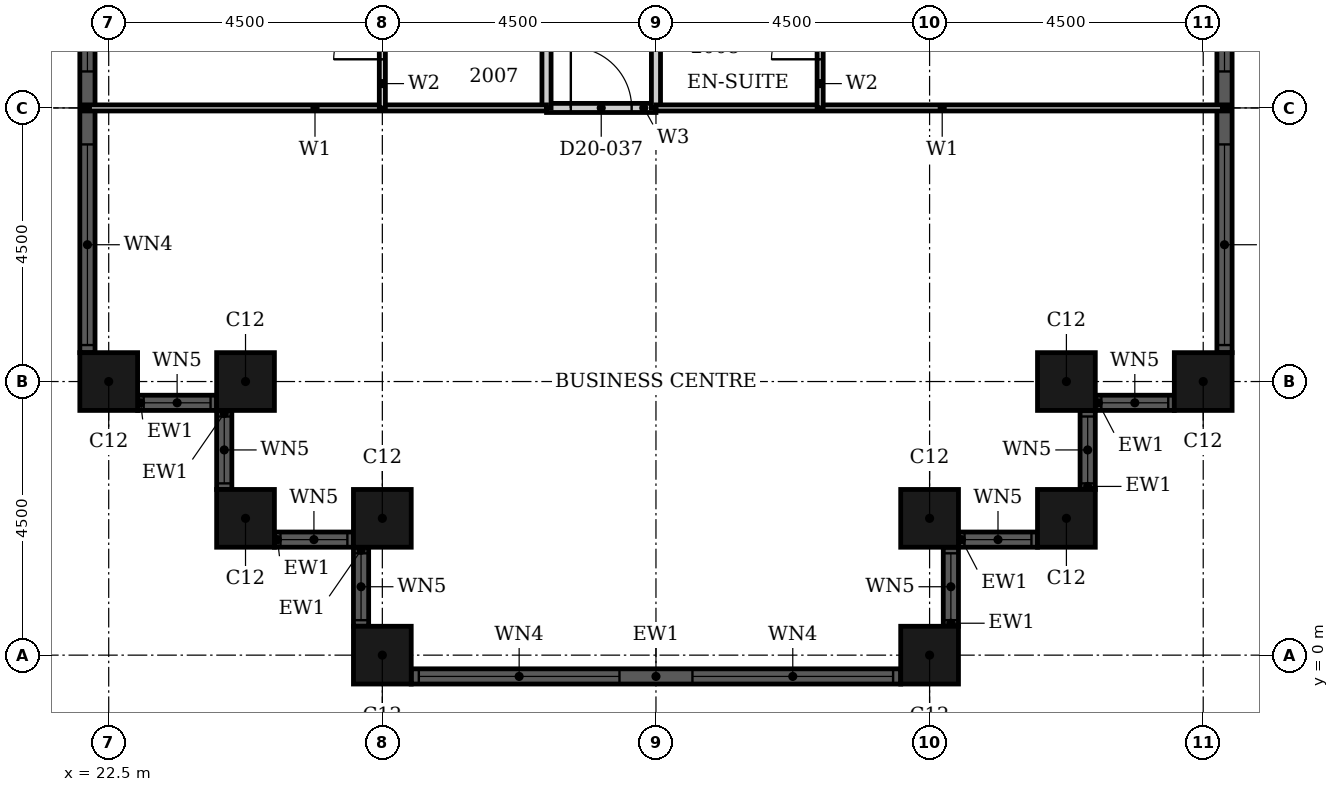
"""IFC4 building model, lengths in metres.
Left out: names, types, materials, properties, quantities, classifications, styles, units other than length and angle.
Written with IfcOpenShell. Run it as: python <this file> out.ifc"""

import sys

from ifc_helpers import new_model, si_unit, direction, frame, frame_2d, origin, origin_2d, place, context, subcontext, project, spatial, rectangle, hollow_rectangle, extrude, element, fill, save


model = new_model("IFC4")
c1 = context("Model", 3, precision=1e-05, world=origin(), true_north=direction((0.0, 1.0)))
c2 = subcontext(c1, "Body", "Model", "MODEL_VIEW")
j1 = project(units=[si_unit("LENGTHUNIT", "METRE"), si_unit("PLANEANGLEUNIT", "RADIAN")], contexts=[c1])
p1 = place(None, origin())
s1 = spatial("IfcSite", under=j1, at=p1, CompositionType="ELEMENT")
p2 = place(p1, origin())
s2 = spatial("IfcBuilding", under=s1, at=p2, CompositionType="ELEMENT")
p3 = place(p2, frame((0.0, 0.0, 85.2)))
s3 = spatial("IfcBuildingStorey", under=s2, at=p3, CompositionType="ELEMENT", Elevation=85.2)
for number, where, z_axis, x_axis in (
    (1, (22.5, 4.5, 0.0), (0.0, 0.0, 1.0), (1.0, 0.0, 0.0)),
    (2, (24.75, 4.5, 0.0), (0.0, 0.0, 1.0), (1.0, 0.0, 0.0)),
    (3, (24.75, 2.25, 0.0), (0.0, 0.0, 1.0), (1.0, 0.0, 0.0)),
    (4, (27.0, 2.25, 0.0), (0.0, 0.0, 1.0), (1.0, 0.0, 0.0)),
    (5, (27.0, 0.0, 0.0), (0.0, 0.0, 1.0), (1.0, 0.0, 0.0)),
    (6, (36.0, 0.0, 0.0), (0.0, 0.0, 1.0), (1.0, 0.0, 0.0)),
    (7, (36.0, 2.25, 0.0), (0.0, 0.0, 1.0), (1.0, 0.0, 0.0)),
    (8, (38.25, 2.25, 0.0), (0.0, 0.0, 1.0), (1.0, 0.0, 0.0)),
    (9, (38.25, 4.5, 0.0), (0.0, 0.0, 1.0), (1.0, 0.0, 0.0)),
    (10, (40.5, 4.5, 0.0), (0.0, 0.0, 1.0), (1.0, 0.0, 0.0)),
):
    element("IfcColumn", number, at=place(p3, frame(where, z_axis=z_axis, x_axis=x_axis)), inside=s3, PredefinedType="COLUMN", context=c2, shape_type="SweptSolid", body=[
        extrude(hollow_rectangle(XDim=0.95, YDim=0.95, WallThickness=0.03, at=origin_2d()), origin(), (0.0, 0.0, 1.0), 3.6),
    ])
p4 = place(p3, frame((22.975, 4.15, 0.0), z_axis=(0.0, 0.0, 1.0), x_axis=(1.0, 0.0, 0.0)))
e11 = element("IfcWall", 11, at=p4, inside=s3, PredefinedType="SOLIDWALL", context=c2, shape_type="SweptSolid", body=[
    extrude(rectangle(XDim=1.3, YDim=0.25, at=frame_2d((0.65, 0.0))), origin(), (0.0, 0.0, 1.0), 3.6),
])
p5 = place(p4, frame((0.1, 0.0, 0.9)))
e12 = element("IfcOpeningElement", 12, at=p5, cuts=e11, PredefinedType="OPENING", context=c2, shape_type="SweptSolid", body=[
    extrude(rectangle(XDim=1.1, YDim=2.08, at=frame_2d((0.55, 1.04))), frame((0.0, 0.135, 0.0), z_axis=(0.0, -1.0, 0.0), x_axis=(1.0, 0.0, 0.0)), (0.0, 0.0, 1.0), 0.27),
])
p6 = place(p3, frame((24.4, 4.025, 0.0), z_axis=(0.0, 0.0, 1.0), x_axis=(0.0, -1.0, 0.0)))
e13 = element("IfcWall", 13, at=p6, inside=s3, PredefinedType="SOLIDWALL", context=c2, shape_type="SweptSolid", body=[
    extrude(rectangle(XDim=1.3, YDim=0.25, at=frame_2d((0.65, 0.0))), origin(), (0.0, 0.0, 1.0), 3.6),
])
p7 = place(p6, frame((0.1, 0.0, 0.9)))
e14 = element("IfcOpeningElement", 14, at=p7, cuts=e13, PredefinedType="OPENING", context=c2, shape_type="SweptSolid", body=[
    extrude(rectangle(XDim=1.1, YDim=2.08, at=frame_2d((0.55, 1.04))), frame((0.0, 0.135, 0.0), z_axis=(0.0, -1.0, 0.0), x_axis=(1.0, 0.0, 0.0)), (0.0, 0.0, 1.0), 0.27),
])
p8 = place(p3, frame((25.225, 1.9, 0.0), z_axis=(0.0, 0.0, 1.0), x_axis=(1.0, 0.0, 0.0)))
e15 = element("IfcWall", 15, at=p8, inside=s3, PredefinedType="SOLIDWALL", context=c2, shape_type="SweptSolid", body=[
    extrude(rectangle(XDim=1.3, YDim=0.25, at=frame_2d((0.65, 0.0))), origin(), (0.0, 0.0, 1.0), 3.6),
])
p9 = place(p8, frame((0.1, 0.0, 0.9)))
e16 = element("IfcOpeningElement", 16, at=p9, cuts=e15, PredefinedType="OPENING", context=c2, shape_type="SweptSolid", body=[
    extrude(rectangle(XDim=1.1, YDim=2.08, at=frame_2d((0.55, 1.04))), frame((0.0, 0.135, 0.0), z_axis=(0.0, -1.0, 0.0), x_axis=(1.0, 0.0, 0.0)), (0.0, 0.0, 1.0), 0.27),
])
p10 = place(p3, frame((26.65, 1.775, 0.0), z_axis=(0.0, 0.0, 1.0), x_axis=(0.0, -1.0, 0.0)))
e17 = element("IfcWall", 17, at=p10, inside=s3, PredefinedType="SOLIDWALL", context=c2, shape_type="SweptSolid", body=[
    extrude(rectangle(XDim=1.3, YDim=0.25, at=frame_2d((0.65, 0.0))), origin(), (0.0, 0.0, 1.0), 3.6),
])
p11 = place(p10, frame((0.1, 0.0, 0.9)))
e18 = element("IfcOpeningElement", 18, at=p11, cuts=e17, PredefinedType="OPENING", context=c2, shape_type="SweptSolid", body=[
    extrude(rectangle(XDim=1.1, YDim=2.08, at=frame_2d((0.55, 1.04))), frame((0.0, 0.135, 0.0), z_axis=(0.0, -1.0, 0.0), x_axis=(1.0, 0.0, 0.0)), (0.0, 0.0, 1.0), 0.27),
])
p12 = place(p3, frame((27.475, -0.35, 0.0), z_axis=(0.0, 0.0, 1.0), x_axis=(1.0, 0.0, 0.0)))
e19 = element("IfcWall", 19, at=p12, inside=s3, PredefinedType="SOLIDWALL", context=c2, shape_type="SweptSolid", body=[
    extrude(rectangle(XDim=8.05, YDim=0.25, at=frame_2d((4.025, 0.0))), origin(), (0.0, 0.0, 1.0), 3.6),
])
p13 = place(p12, frame((0.125, 0.0, 0.9)))
e20 = element("IfcOpeningElement", 20, at=p13, cuts=e19, PredefinedType="OPENING", context=c2, shape_type="SweptSolid", body=[
    extrude(rectangle(XDim=3.3, YDim=2.08, at=frame_2d((1.65, 1.04))), frame((0.0, 0.135, 0.0), z_axis=(0.0, -1.0, 0.0), x_axis=(1.0, 0.0, 0.0)), (0.0, 0.0, 1.0), 0.27),
])
p14 = place(p12, frame((4.625, 0.0, 0.9)))
e21 = element("IfcOpeningElement", 21, at=p14, cuts=e19, PredefinedType="OPENING", context=c2, shape_type="SweptSolid", body=[
    extrude(rectangle(XDim=3.3, YDim=2.08, at=frame_2d((1.65, 1.04))), frame((0.0, 0.135, 0.0), z_axis=(0.0, -1.0, 0.0), x_axis=(1.0, 0.0, 0.0)), (0.0, 0.0, 1.0), 0.27),
])
p15 = place(p3, frame((36.35, 0.475, 0.0), z_axis=(0.0, 0.0, 1.0), x_axis=(0.0, 1.0, 0.0)))
e22 = element("IfcWall", 22, at=p15, inside=s3, PredefinedType="SOLIDWALL", context=c2, shape_type="SweptSolid", body=[
    extrude(rectangle(XDim=1.3, YDim=0.25, at=frame_2d((0.65, 0.0))), origin(), (0.0, 0.0, 1.0), 3.6),
])
p16 = place(p15, frame((0.1, 0.0, 0.9)))
e23 = element("IfcOpeningElement", 23, at=p16, cuts=e22, PredefinedType="OPENING", context=c2, shape_type="SweptSolid", body=[
    extrude(rectangle(XDim=1.1, YDim=2.08, at=frame_2d((0.55, 1.04))), frame((0.0, 0.135, 0.0), z_axis=(0.0, -1.0, 0.0), x_axis=(1.0, 0.0, 0.0)), (0.0, 0.0, 1.0), 0.27),
])
p17 = place(p3, frame((36.475, 1.9, 0.0), z_axis=(0.0, 0.0, 1.0), x_axis=(1.0, 0.0, 0.0)))
e24 = element("IfcWall", 24, at=p17, inside=s3, PredefinedType="SOLIDWALL", context=c2, shape_type="SweptSolid", body=[
    extrude(rectangle(XDim=1.3, YDim=0.25, at=frame_2d((0.65, 0.0))), origin(), (0.0, 0.0, 1.0), 3.6),
])
p18 = place(p17, frame((0.1, 0.0, 0.9)))
e25 = element("IfcOpeningElement", 25, at=p18, cuts=e24, PredefinedType="OPENING", context=c2, shape_type="SweptSolid", body=[
    extrude(rectangle(XDim=1.1, YDim=2.08, at=frame_2d((0.55, 1.04))), frame((0.0, 0.135, 0.0), z_axis=(0.0, -1.0, 0.0), x_axis=(1.0, 0.0, 0.0)), (0.0, 0.0, 1.0), 0.27),
])
p19 = place(p3, frame((38.6, 2.725, 0.0), z_axis=(0.0, 0.0, 1.0), x_axis=(0.0, 1.0, 0.0)))
e26 = element("IfcWall", 26, at=p19, inside=s3, PredefinedType="SOLIDWALL", context=c2, shape_type="SweptSolid", body=[
    extrude(rectangle(XDim=1.3, YDim=0.25, at=frame_2d((0.65, 0.0))), origin(), (0.0, 0.0, 1.0), 3.6),
])
p20 = place(p19, frame((0.1, 0.0, 0.9)))
e27 = element("IfcOpeningElement", 27, at=p20, cuts=e26, PredefinedType="OPENING", context=c2, shape_type="SweptSolid", body=[
    extrude(rectangle(XDim=1.1, YDim=2.08, at=frame_2d((0.55, 1.04))), frame((0.0, 0.135, 0.0), z_axis=(0.0, -1.0, 0.0), x_axis=(1.0, 0.0, 0.0)), (0.0, 0.0, 1.0), 0.27),
])
p21 = place(p3, frame((38.725, 4.15, 0.0), z_axis=(0.0, 0.0, 1.0), x_axis=(1.0, 0.0, 0.0)))
e28 = element("IfcWall", 28, at=p21, inside=s3, PredefinedType="SOLIDWALL", context=c2, shape_type="SweptSolid", body=[
    extrude(rectangle(XDim=1.3, YDim=0.25, at=frame_2d((0.65, 0.0))), origin(), (0.0, 0.0, 1.0), 3.6),
])
p22 = place(p21, frame((0.1, 0.0, 0.9)))
e29 = element("IfcOpeningElement", 29, at=p22, cuts=e28, PredefinedType="OPENING", context=c2, shape_type="SweptSolid", body=[
    extrude(rectangle(XDim=1.1, YDim=2.08, at=frame_2d((0.55, 1.04))), frame((0.0, 0.135, 0.0), z_axis=(0.0, -1.0, 0.0), x_axis=(1.0, 0.0, 0.0)), (0.0, 0.0, 1.0), 0.27),
])
p23 = place(p3, frame((40.85, 4.975, 0.0), z_axis=(0.0, 0.0, 1.0), x_axis=(0.0, 1.0, 0.0)))
e30 = element("IfcWall", 30, at=p23, inside=s3, PredefinedType="SOLIDWALL", context=c2, shape_type="SweptSolid", body=[
    extrude(rectangle(XDim=8.05, YDim=0.25, at=frame_2d((4.025, 0.0))), origin(), (0.0, 0.0, 1.0), 3.6),
])
p24 = place(p23, frame((0.125, 0.0, 0.9)))
e31 = element("IfcOpeningElement", 31, at=p24, cuts=e30, PredefinedType="OPENING", context=c2, shape_type="SweptSolid", body=[
    extrude(rectangle(XDim=3.3, YDim=2.08, at=frame_2d((1.65, 1.04))), frame((0.0, 0.135, 0.0), z_axis=(0.0, -1.0, 0.0), x_axis=(1.0, 0.0, 0.0)), (0.0, 0.0, 1.0), 0.27),
])
p25 = place(p23, frame((4.625, 0.0, 0.9)))
e32 = element("IfcOpeningElement", 32, at=p25, cuts=e30, PredefinedType="OPENING", context=c2, shape_type="SweptSolid", body=[
    extrude(rectangle(XDim=3.3, YDim=2.08, at=frame_2d((1.65, 1.04))), frame((0.0, 0.135, 0.0), z_axis=(0.0, -1.0, 0.0), x_axis=(1.0, 0.0, 0.0)), (0.0, 0.0, 1.0), 0.27),
])
p26 = place(p3, frame((22.15, 13.025, 0.0), z_axis=(0.0, 0.0, 1.0), x_axis=(0.0, -1.0, 0.0)))
e33 = element("IfcWall", 33, at=p26, inside=s3, PredefinedType="SOLIDWALL", context=c2, shape_type="SweptSolid", body=[
    extrude(rectangle(XDim=8.05, YDim=0.25, at=frame_2d((4.025, 0.0))), origin(), (0.0, 0.0, 1.0), 3.6),
])
p27 = place(p26, frame((0.125, 0.0, 0.9)))
e34 = element("IfcOpeningElement", 34, at=p27, cuts=e33, PredefinedType="OPENING", context=c2, shape_type="SweptSolid", body=[
    extrude(rectangle(XDim=3.3, YDim=2.08, at=frame_2d((1.65, 1.04))), frame((0.0, 0.135, 0.0), z_axis=(0.0, -1.0, 0.0), x_axis=(1.0, 0.0, 0.0)), (0.0, 0.0, 1.0), 0.27),
])
p28 = place(p26, frame((4.625, 0.0, 0.9)))
e35 = element("IfcOpeningElement", 35, at=p28, cuts=e33, PredefinedType="OPENING", context=c2, shape_type="SweptSolid", body=[
    extrude(rectangle(XDim=3.3, YDim=2.08, at=frame_2d((1.65, 1.04))), frame((0.0, 0.135, 0.0), z_axis=(0.0, -1.0, 0.0), x_axis=(1.0, 0.0, 0.0)), (0.0, 0.0, 1.0), 0.27),
])
p29 = place(p3, frame((29.7, 9.0, 0.0), z_axis=(0.0, 0.0, 1.0), x_axis=(1.0, 0.0, 0.0)))
e36 = element("IfcWall", 36, at=p29, inside=s3, PredefinedType="PARTITIONING", context=c2, shape_type="SweptSolid", body=[
    extrude(rectangle(XDim=1.8, YDim=0.15, at=frame_2d((0.9, 0.0))), origin(), (0.0, 0.0, 1.0), 3.3),
])
p30 = place(p29, frame((0.4, 0.0, 0.0)))
e37 = element("IfcOpeningElement", 37, at=p30, cuts=e36, PredefinedType="OPENING", context=c2, shape_type="SweptSolid", body=[
    extrude(rectangle(XDim=1.0, YDim=2.1, at=frame_2d((0.5, 1.05))), frame((0.0, 0.085, 0.0), z_axis=(0.0, -1.0, 0.0), x_axis=(1.0, 0.0, 0.0)), (0.0, 0.0, 1.0), 0.17),
])
p31 = place(p3, frame((29.7, 9.0, 0.0), z_axis=(0.0, 0.0, 1.0), x_axis=(0.0, 1.0, 0.0)))
e38 = element("IfcWall", 38, at=p31, inside=s3, PredefinedType="PARTITIONING", context=c2, shape_type="SweptSolid", body=[
    extrude(rectangle(XDim=11.7, YDim=0.15, at=frame_2d((5.85, 0.0))), origin(), (0.0, 0.0, 1.0), 3.3),
])
p32 = place(p31, frame((2.95, 0.0, 0.0)))
e39 = element("IfcOpeningElement", 39, at=p32, cuts=e38, PredefinedType="OPENING", context=c2, shape_type="SweptSolid", body=[
    extrude(rectangle(XDim=1.0, YDim=2.1, at=frame_2d((0.5, 1.05))), frame((0.0, 0.085, 0.0), z_axis=(0.0, -1.0, 0.0), x_axis=(1.0, 0.0, 0.0)), (0.0, 0.0, 1.0), 0.17),
])
p33 = place(p3, frame((31.5, 9.0, 0.0), z_axis=(0.0, 0.0, 1.0), x_axis=(0.0, 1.0, 0.0)))
e40 = element("IfcWall", 40, at=p33, inside=s3, PredefinedType="PARTITIONING", context=c2, shape_type="SweptSolid", body=[
    extrude(rectangle(XDim=11.7, YDim=0.15, at=frame_2d((5.85, 0.0))), origin(), (0.0, 0.0, 1.0), 2.58),
])
p34 = place(p33, frame((2.95, 0.0, 0.0)))
e41 = element("IfcOpeningElement", 41, at=p34, cuts=e40, PredefinedType="OPENING", context=c2, shape_type="SweptSolid", body=[
    extrude(rectangle(XDim=1.0, YDim=2.1, at=frame_2d((0.5, 1.05))), frame((0.0, 0.085, 0.0), z_axis=(0.0, -1.0, 0.0), x_axis=(1.0, 0.0, 0.0)), (0.0, 0.0, 1.0), 0.17),
])
p35 = place(p3, frame((31.5, 9.0, 0.0), z_axis=(0.0, 0.0, 1.0), x_axis=(1.0, 0.0, 0.0)))
e42 = element("IfcWall", 42, at=p35, inside=s3, PredefinedType="PARTITIONING", context=c2, shape_type="SweptSolid", body=[
    extrude(rectangle(XDim=9.415, YDim=0.1, at=frame_2d((4.708, 0.0))), origin(), (0.0, 0.0, 1.0), 3.3),
])
p36 = place(p3, frame((22.085, 9.0, 0.0), z_axis=(0.0, 0.0, 1.0), x_axis=(1.0, 0.0, 0.0)))
e43 = element("IfcWall", 43, at=p36, inside=s3, PredefinedType="PARTITIONING", context=c2, shape_type="SweptSolid", body=[
    extrude(rectangle(XDim=7.615, YDim=0.1, at=frame_2d((3.808, 0.0))), origin(), (0.0, 0.0, 1.0), 3.3),
])
p37 = place(p3, frame((27.0, 9.0, 0.0), z_axis=(0.0, 0.0, 1.0), x_axis=(0.0, 1.0, 0.0)))
e44 = element("IfcWall", 44, at=p37, inside=s3, PredefinedType="PARTITIONING", context=c2, shape_type="SweptSolid", body=[
    extrude(rectangle(XDim=2.4, YDim=0.1, at=frame_2d((1.2, 0.0))), origin(), (0.0, 0.0, 1.0), 2.58),
])
p38 = place(p37, frame((0.8, 0.0, 0.0)))
e45 = element("IfcOpeningElement", 45, at=p38, cuts=e44, PredefinedType="OPENING", context=c2, shape_type="SweptSolid", body=[
    extrude(rectangle(XDim=0.8, YDim=2.1, at=frame_2d((0.4, 1.05))), frame((0.0, 0.06, 0.0), z_axis=(0.0, -1.0, 0.0), x_axis=(1.0, 0.0, 0.0)), (0.0, 0.0, 1.0), 0.12),
])
p39 = place(p3, frame((34.2, 9.0, 0.0), z_axis=(0.0, 0.0, 1.0), x_axis=(0.0, 1.0, 0.0)))
e46 = element("IfcWall", 46, at=p39, inside=s3, PredefinedType="PARTITIONING", context=c2, shape_type="SweptSolid", body=[
    extrude(rectangle(XDim=2.4, YDim=0.1, at=frame_2d((1.2, 0.0))), origin(), (0.0, 0.0, 1.0), 3.3),
])
p40 = place(p39, frame((0.8, 0.0, 0.0)))
e47 = element("IfcOpeningElement", 47, at=p40, cuts=e46, PredefinedType="OPENING", context=c2, shape_type="SweptSolid", body=[
    extrude(rectangle(XDim=0.8, YDim=2.1, at=frame_2d((0.4, 1.05))), frame((0.0, 0.06, 0.0), z_axis=(0.0, -1.0, 0.0), x_axis=(1.0, 0.0, 0.0)), (0.0, 0.0, 1.0), 0.12),
])
p41 = place(p5, origin())
e48 = element("IfcWindow", 48, at=p41, inside=s3, PartitioningType="SINGLE_PANEL", PredefinedType="WINDOW", context=c2, shape_type="SweptSolid", body=[
    extrude(rectangle(XDim=1.1, YDim=2.08, at=frame_2d((0.55, 1.04))), frame((0.0, 0.03, 0.0), z_axis=(0.0, -1.0, 0.0), x_axis=(1.0, 0.0, 0.0)), (0.0, 0.0, 1.0), 0.06),
])
fill(e12, e48)
p42 = place(p7, origin())
e49 = element("IfcWindow", 49, at=p42, inside=s3, PartitioningType="SINGLE_PANEL", PredefinedType="WINDOW", context=c2, shape_type="SweptSolid", body=[
    extrude(rectangle(XDim=1.1, YDim=2.08, at=frame_2d((0.55, 1.04))), frame((0.0, 0.03, 0.0), z_axis=(0.0, -1.0, 0.0), x_axis=(1.0, 0.0, 0.0)), (0.0, 0.0, 1.0), 0.06),
])
fill(e14, e49)
p43 = place(p9, origin())
e50 = element("IfcWindow", 50, at=p43, inside=s3, PartitioningType="SINGLE_PANEL", PredefinedType="WINDOW", context=c2, shape_type="SweptSolid", body=[
    extrude(rectangle(XDim=1.1, YDim=2.08, at=frame_2d((0.55, 1.04))), frame((0.0, 0.03, 0.0), z_axis=(0.0, -1.0, 0.0), x_axis=(1.0, 0.0, 0.0)), (0.0, 0.0, 1.0), 0.06),
])
fill(e16, e50)
p44 = place(p11, origin())
e51 = element("IfcWindow", 51, at=p44, inside=s3, PartitioningType="SINGLE_PANEL", PredefinedType="WINDOW", context=c2, shape_type="SweptSolid", body=[
    extrude(rectangle(XDim=1.1, YDim=2.08, at=frame_2d((0.55, 1.04))), frame((0.0, 0.03, 0.0), z_axis=(0.0, -1.0, 0.0), x_axis=(1.0, 0.0, 0.0)), (0.0, 0.0, 1.0), 0.06),
])
fill(e18, e51)
p45 = place(p13, origin())
e52 = element("IfcWindow", 52, at=p45, inside=s3, PartitioningType="SINGLE_PANEL", PredefinedType="WINDOW", context=c2, shape_type="SweptSolid", body=[
    extrude(rectangle(XDim=3.3, YDim=2.08, at=frame_2d((1.65, 1.04))), frame((0.0, 0.03, 0.0), z_axis=(0.0, -1.0, 0.0), x_axis=(1.0, 0.0, 0.0)), (0.0, 0.0, 1.0), 0.06),
])
fill(e20, e52)
p46 = place(p14, origin())
e53 = element("IfcWindow", 53, at=p46, inside=s3, PartitioningType="SINGLE_PANEL", PredefinedType="WINDOW", context=c2, shape_type="SweptSolid", body=[
    extrude(rectangle(XDim=3.3, YDim=2.08, at=frame_2d((1.65, 1.04))), frame((0.0, 0.03, 0.0), z_axis=(0.0, -1.0, 0.0), x_axis=(1.0, 0.0, 0.0)), (0.0, 0.0, 1.0), 0.06),
])
fill(e21, e53)
p47 = place(p16, origin())
e54 = element("IfcWindow", 54, at=p47, inside=s3, PartitioningType="SINGLE_PANEL", PredefinedType="WINDOW", context=c2, shape_type="SweptSolid", body=[
    extrude(rectangle(XDim=1.1, YDim=2.08, at=frame_2d((0.55, 1.04))), frame((0.0, 0.03, 0.0), z_axis=(0.0, -1.0, 0.0), x_axis=(1.0, 0.0, 0.0)), (0.0, 0.0, 1.0), 0.06),
])
fill(e23, e54)
p48 = place(p18, origin())
e55 = element("IfcWindow", 55, at=p48, inside=s3, PartitioningType="SINGLE_PANEL", PredefinedType="WINDOW", context=c2, shape_type="SweptSolid", body=[
    extrude(rectangle(XDim=1.1, YDim=2.08, at=frame_2d((0.55, 1.04))), frame((0.0, 0.03, 0.0), z_axis=(0.0, -1.0, 0.0), x_axis=(1.0, 0.0, 0.0)), (0.0, 0.0, 1.0), 0.06),
])
fill(e25, e55)
p49 = place(p20, origin())
e56 = element("IfcWindow", 56, at=p49, inside=s3, PartitioningType="SINGLE_PANEL", PredefinedType="WINDOW", context=c2, shape_type="SweptSolid", body=[
    extrude(rectangle(XDim=1.1, YDim=2.08, at=frame_2d((0.55, 1.04))), frame((0.0, 0.03, 0.0), z_axis=(0.0, -1.0, 0.0), x_axis=(1.0, 0.0, 0.0)), (0.0, 0.0, 1.0), 0.06),
])
fill(e27, e56)
p50 = place(p22, origin())
e57 = element("IfcWindow", 57, at=p50, inside=s3, PartitioningType="SINGLE_PANEL", PredefinedType="WINDOW", context=c2, shape_type="SweptSolid", body=[
    extrude(rectangle(XDim=1.1, YDim=2.08, at=frame_2d((0.55, 1.04))), frame((0.0, 0.03, 0.0), z_axis=(0.0, -1.0, 0.0), x_axis=(1.0, 0.0, 0.0)), (0.0, 0.0, 1.0), 0.06),
])
fill(e29, e57)
p51 = place(p24, origin())
e58 = element("IfcWindow", 58, at=p51, inside=s3, PartitioningType="SINGLE_PANEL", PredefinedType="WINDOW", context=c2, shape_type="SweptSolid", body=[
    extrude(rectangle(XDim=3.3, YDim=2.08, at=frame_2d((1.65, 1.04))), frame((0.0, 0.03, 0.0), z_axis=(0.0, -1.0, 0.0), x_axis=(1.0, 0.0, 0.0)), (0.0, 0.0, 1.0), 0.06),
])
fill(e31, e58)
p52 = place(p25, origin())
e59 = element("IfcWindow", 59, at=p52, inside=s3, PartitioningType="SINGLE_PANEL", PredefinedType="WINDOW", context=c2, shape_type="SweptSolid", body=[
    extrude(rectangle(XDim=3.3, YDim=2.08, at=frame_2d((1.65, 1.04))), frame((0.0, 0.03, 0.0), z_axis=(0.0, -1.0, 0.0), x_axis=(1.0, 0.0, 0.0)), (0.0, 0.0, 1.0), 0.06),
])
fill(e32, e59)
p53 = place(p27, origin())
e60 = element("IfcWindow", 60, at=p53, inside=s3, PartitioningType="SINGLE_PANEL", PredefinedType="WINDOW", context=c2, shape_type="SweptSolid", body=[
    extrude(rectangle(XDim=3.3, YDim=2.08, at=frame_2d((1.65, 1.04))), frame((0.0, 0.03, 0.0), z_axis=(0.0, -1.0, 0.0), x_axis=(1.0, 0.0, 0.0)), (0.0, 0.0, 1.0), 0.06),
])
fill(e34, e60)
p54 = place(p28, origin())
e61 = element("IfcWindow", 61, at=p54, inside=s3, PartitioningType="SINGLE_PANEL", PredefinedType="WINDOW", context=c2, shape_type="SweptSolid", body=[
    extrude(rectangle(XDim=3.3, YDim=2.08, at=frame_2d((1.65, 1.04))), frame((0.0, 0.03, 0.0), z_axis=(0.0, -1.0, 0.0), x_axis=(1.0, 0.0, 0.0)), (0.0, 0.0, 1.0), 0.06),
])
fill(e35, e61)
p55 = place(p38, origin())
e62 = element("IfcDoor", 62, at=p55, inside=s3, OperationType="SINGLE_SWING_LEFT", PredefinedType="DOOR", context=c2, shape_type="SweptSolid", body=[
    extrude(rectangle(XDim=0.8, YDim=2.1, at=frame_2d((0.4, 1.05))), frame((0.0, 0.025, 0.0), z_axis=(0.0, -1.0, 0.0), x_axis=(1.0, 0.0, 0.0)), (0.0, 0.0, 1.0), 0.05),
])
fill(e45, e62)
p56 = place(p40, origin())
e63 = element("IfcDoor", 63, at=p56, inside=s3, OperationType="SINGLE_SWING_LEFT", PredefinedType="DOOR", context=c2, shape_type="SweptSolid", body=[
    extrude(rectangle(XDim=0.8, YDim=2.1, at=frame_2d((0.4, 1.05))), frame((0.0, 0.025, 0.0), z_axis=(0.0, -1.0, 0.0), x_axis=(1.0, 0.0, 0.0)), (0.0, 0.0, 1.0), 0.05),
])
fill(e47, e63)
p57 = place(p30, origin())
e64 = element("IfcDoor", 64, at=p57, inside=s3, OperationType="SINGLE_SWING_LEFT", PredefinedType="DOOR", context=c2, shape_type="SweptSolid", body=[
    extrude(rectangle(XDim=1.0, YDim=2.1, at=frame_2d((0.5, 1.05))), frame((0.0, 0.025, 0.0), z_axis=(0.0, -1.0, 0.0), x_axis=(1.0, 0.0, 0.0)), (0.0, 0.0, 1.0), 0.05),
])
fill(e37, e64)
save(model, sys.argv[1])
